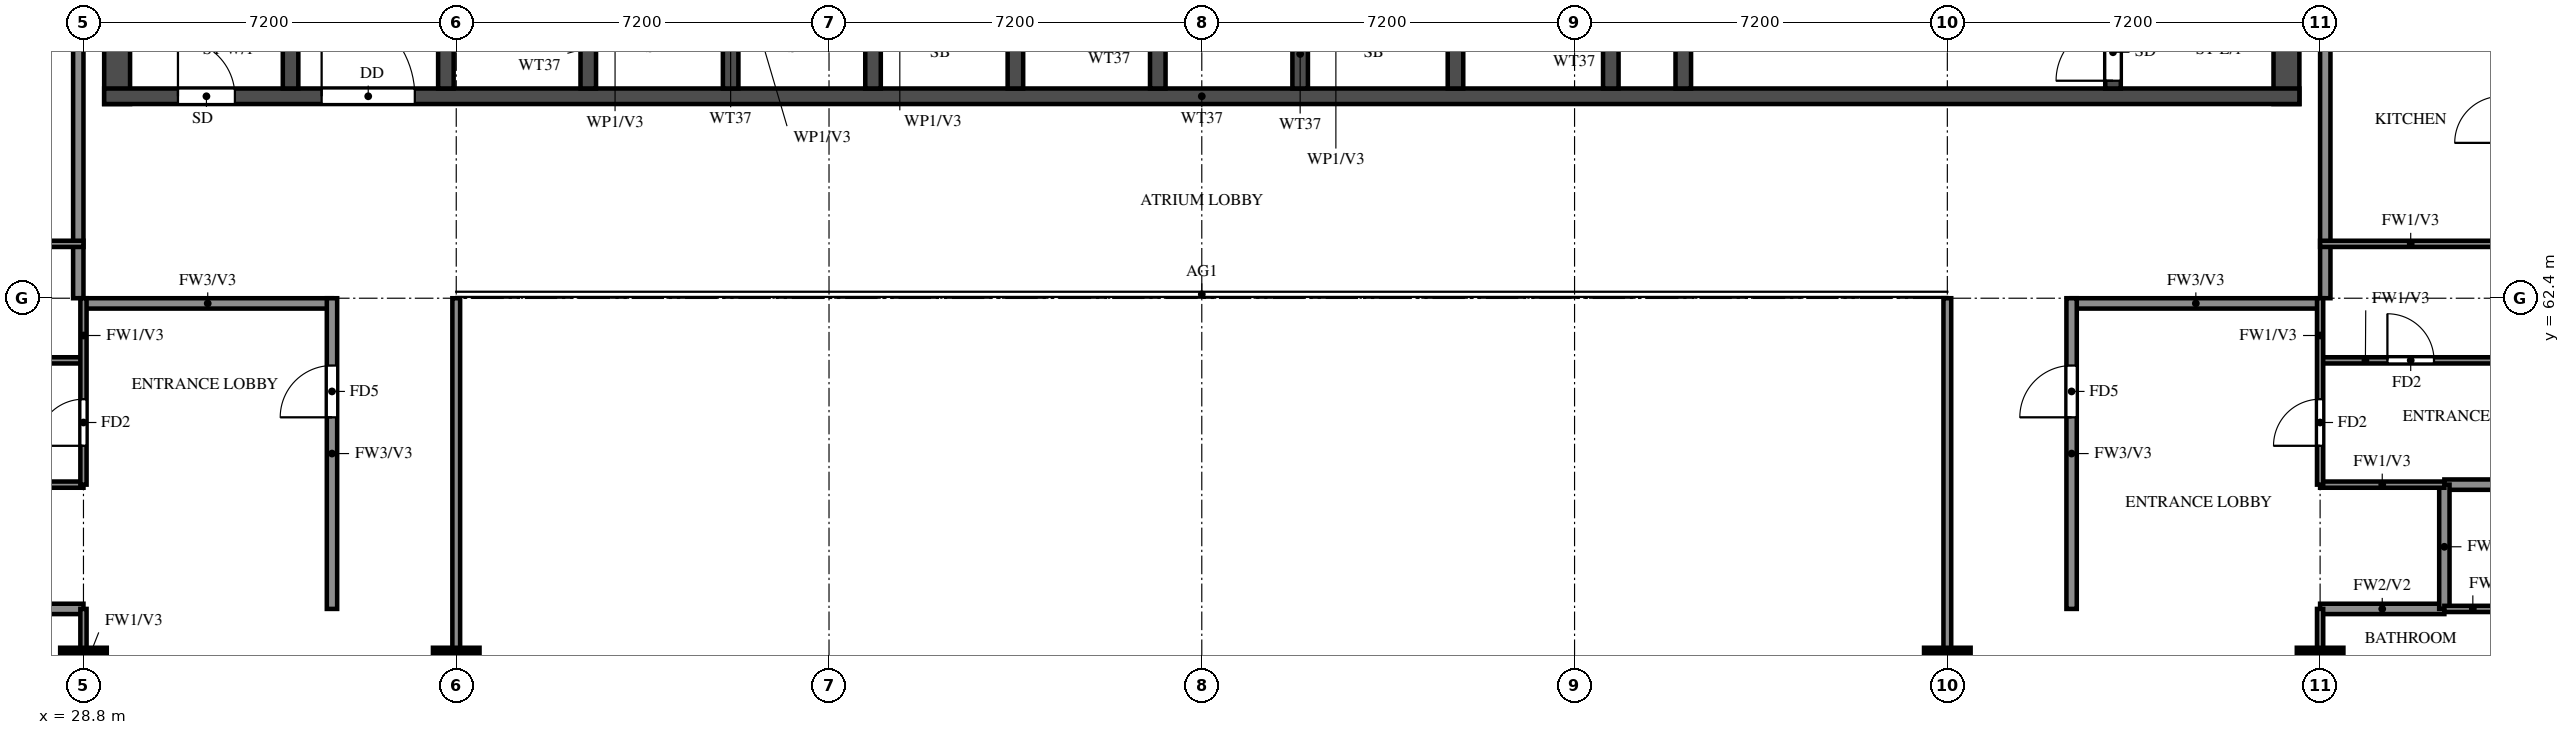
"""IFC4 building model, lengths in metres.
Left out: names, types, materials, properties, quantities, classifications, styles, units other than length and angle.
Written with IfcOpenShell. Run it as: python <this file> out.ifc"""

import sys

from ifc_helpers import new_model, si_unit, direction, frame, frame_2d, origin, origin_2d, place, context, subcontext, project, spatial, rectangle, extrude, source, transform, mapped, element, fill, save


model = new_model("IFC4")
c1 = context("Model", 3, precision=1e-05, world=origin(), true_north=direction((0.0, 1.0)))
c2 = subcontext(c1, "Body", "Model", "MODEL_VIEW")
j1 = project(units=[si_unit("LENGTHUNIT", "METRE"), si_unit("PLANEANGLEUNIT", "RADIAN")], contexts=[c1])
p1 = place(None, origin())
s1 = spatial("IfcSite", under=j1, at=p1, CompositionType="ELEMENT")
p2 = place(p1, origin())
s2 = spatial("IfcBuilding", under=s1, at=p2, CompositionType="ELEMENT")
p3 = place(p2, frame((0.0, 0.0, 215.0)))
s3 = spatial("IfcBuildingStorey", under=s2, at=p3, CompositionType="ELEMENT", Elevation=215.0)
m1 = source(origin(), c2, "Body", "SweptSolid", [
    extrude(rectangle(XDim=0.9, YDim=0.9, at=origin_2d()), origin(), (0.0, 0.0, 1.0), 3.22),
])
for number, where, z_axis, x_axis in (
    (1, (28.8, 55.2, 0.0), (0.0, 0.0, 1.0), (1.0, 0.0, 0.0)),
    (2, (36.0, 55.2, 0.0), (0.0, 0.0, 1.0), (1.0, 0.0, 0.0)),
    (3, (64.8, 55.2, 0.0), (0.0, 0.0, 1.0), (1.0, 0.0, 0.0)),
    (4, (72.0, 55.2, 0.0), (0.0, 0.0, 1.0), (1.0, 0.0, 0.0)),
):
    element("IfcColumn", number, at=place(p3, frame(where, z_axis=z_axis, x_axis=x_axis)), inside=s3, PredefinedType="COLUMN", context=c2, shape_type="MappedRepresentation", body=[
        mapped(m1, transform((0.0, 0.0, 0.0))),
    ])
for number, where, z_axis, x_axis in (
    (5, (29.45, 66.15, 0.0), (0.0, 0.0, 1.0), (0.0, 1.0, 0.0)),
    (6, (71.35, 66.15, 0.0), (0.0, 0.0, 1.0), (0.0, 1.0, 0.0)),
):
    element("IfcWall", number, at=place(p3, frame(where, z_axis=z_axis, x_axis=x_axis)), inside=s3, PredefinedType="SHEAR", context=c2, shape_type="SweptSolid", body=[
        extrude(rectangle(XDim=11.85, YDim=0.5, at=frame_2d((5.925, 0.0))), origin(), (0.0, 0.0, 1.0), 3.22),
    ])
p4 = place(p3, frame((29.2, 66.3, 0.0), z_axis=(0.0, 0.0, 1.0), x_axis=(1.0, 0.0, 0.0)))
e7 = element("IfcWall", 7, at=p4, inside=s3, PredefinedType="SHEAR", context=c2, shape_type="SweptSolid", body=[
    extrude(rectangle(XDim=42.4, YDim=0.3, at=frame_2d((21.2, 0.0))), origin(), (0.0, 0.0, 1.0), 3.22),
])
p5 = place(p4, frame((1.425, 0.0, 0.0)))
e8 = element("IfcOpeningElement", 8, at=p5, cuts=e7, PredefinedType="OPENING", context=c2, shape_type="SweptSolid", body=[
    extrude(rectangle(XDim=1.1, YDim=2.1, at=frame_2d((0.55, 1.05))), frame((0.0, 0.16, 0.0), z_axis=(0.0, -1.0, 0.0), x_axis=(1.0, 0.0, 0.0)), (0.0, 0.0, 1.0), 0.32),
])
p6 = place(p4, frame((4.2, 0.0, 0.0)))
e9 = element("IfcOpeningElement", 9, at=p6, cuts=e7, PredefinedType="OPENING", context=c2, shape_type="SweptSolid", body=[
    extrude(rectangle(XDim=1.8, YDim=2.1, at=frame_2d((0.9, 1.05))), frame((0.0, 0.16, 0.0), z_axis=(0.0, -1.0, 0.0), x_axis=(1.0, 0.0, 0.0)), (0.0, 0.0, 1.0), 0.32),
])
p7 = place(p3, frame((32.8, 66.45, 0.0), z_axis=(0.0, 0.0, 1.0), x_axis=(0.0, 1.0, 0.0)))
e10 = element("IfcWall", 10, at=p7, inside=s3, PredefinedType="SHEAR", context=c2, shape_type="SweptSolid", body=[
    extrude(rectangle(XDim=11.05, YDim=0.3, at=frame_2d((5.525, 0.0))), origin(), (0.0, 0.0, 1.0), 3.22),
])
p8 = place(p3, frame((68.0, 66.45, 0.0), z_axis=(0.0, 0.0, 1.0), x_axis=(0.0, 1.0, 0.0)))
e11 = element("IfcWall", 11, at=p8, inside=s3, PredefinedType="SHEAR", context=c2, shape_type="SweptSolid", body=[
    extrude(rectangle(XDim=11.05, YDim=0.3, at=frame_2d((5.525, 0.0))), origin(), (0.0, 0.0, 1.0), 3.22),
])
p9 = place(p8, frame((0.15, 0.0, 0.0)))
e12 = element("IfcOpeningElement", 12, at=p9, cuts=e11, PredefinedType="OPENING", context=c2, shape_type="SweptSolid", body=[
    extrude(rectangle(XDim=1.1, YDim=2.1, at=frame_2d((0.55, 1.05))), frame((0.0, 0.16, 0.0), z_axis=(0.0, -1.0, 0.0), x_axis=(1.0, 0.0, 0.0)), (0.0, 0.0, 1.0), 0.32),
])
p10 = place(p3, frame((59.7, 66.45, 0.0), z_axis=(0.0, 0.0, 1.0), x_axis=(0.0, 1.0, 0.0)))
e13 = element("IfcWall", 13, at=p10, inside=s3, PredefinedType="SHEAR", context=c2, shape_type="SweptSolid", body=[
    extrude(rectangle(XDim=6.175, YDim=0.3, at=frame_2d((3.087, 0.0))), origin(), (0.0, 0.0, 1.0), 3.22),
])
p11 = place(p10, frame((3.85, 0.0, 0.0)))
e14 = element("IfcOpeningElement", 14, at=p11, cuts=e13, PredefinedType="OPENING", context=c2, shape_type="SweptSolid", body=[
    extrude(rectangle(XDim=1.2, YDim=2.1, at=frame_2d((0.6, 1.05))), frame((0.0, 0.16, 0.0), z_axis=(0.0, -1.0, 0.0), x_axis=(1.0, 0.0, 0.0)), (0.0, 0.0, 1.0), 0.32),
])
for number, where, z_axis, x_axis in (
    (15, (35.8, 66.45, 0.0), (0.0, 0.0, 1.0), (0.0, 1.0, 0.0)),
    (16, (38.55, 66.45, 0.0), (0.0, 0.0, 1.0), (0.0, 1.0, 0.0)),
    (17, (41.3, 66.45, 0.0), (0.0, 0.0, 1.0), (0.0, 1.0, 0.0)),
    (18, (44.05, 66.45, 0.0), (0.0, 0.0, 1.0), (0.0, 1.0, 0.0)),
    (19, (46.8, 66.45, 0.0), (0.0, 0.0, 1.0), (0.0, 1.0, 0.0)),
    (20, (49.55, 66.45, 0.0), (0.0, 0.0, 1.0), (0.0, 1.0, 0.0)),
    (21, (52.3, 66.45, 0.0), (0.0, 0.0, 1.0), (0.0, 1.0, 0.0)),
    (22, (55.3, 66.45, 0.0), (0.0, 0.0, 1.0), (0.0, 1.0, 0.0)),
    (23, (58.3, 66.45, 0.0), (0.0, 0.0, 1.0), (0.0, 1.0, 0.0)),
):
    element("IfcWall", number, at=place(p3, frame(where, z_axis=z_axis, x_axis=x_axis)), inside=s3, PredefinedType="SHEAR", context=c2, shape_type="SweptSolid", body=[
        extrude(rectangle(XDim=2.425, YDim=0.3, at=frame_2d((1.212, 0.0))), origin(), (0.0, 0.0, 1.0), 3.22),
    ])
for number, where, z_axis, x_axis in (
    (24, (28.8, 62.3, 0.0), (0.0, 0.0, 1.0), (1.0, 0.0, 0.0)),
    (25, (67.2, 62.3, 0.0), (0.0, 0.0, 1.0), (1.0, 0.0, 0.0)),
):
    element("IfcWall", number, at=place(p3, frame(where, z_axis=z_axis, x_axis=x_axis)), inside=s3, PredefinedType="SOLIDWALL", context=c2, shape_type="SweptSolid", body=[
        extrude(rectangle(XDim=4.8, YDim=0.2, at=frame_2d((2.4, 0.0))), origin(), (0.0, 0.0, 1.0), 3.22),
    ])
p12 = place(p3, frame((28.7, 62.4, 0.0), z_axis=(0.0, 0.0, 1.0), x_axis=(0.0, 1.0, 0.0)))
e26 = element("IfcWall", 26, at=p12, inside=s3, PredefinedType="SOLIDWALL", context=c2, shape_type="SweptSolid", body=[
    extrude(rectangle(XDim=15.6, YDim=0.2, at=frame_2d((7.8, 0.0))), origin(), (0.0, 0.0, 1.0), 3.22),
])
p13 = place(p3, frame((33.6, 56.4, 0.0), z_axis=(0.0, 0.0, 1.0), x_axis=(0.0, 1.0, 0.0)))
e27 = element("IfcWall", 27, at=p13, inside=s3, PredefinedType="SOLIDWALL", context=c2, shape_type="SweptSolid", body=[
    extrude(rectangle(XDim=6.0, YDim=0.2, at=frame_2d((3.0, 0.0))), origin(), (0.0, 0.0, 1.0), 3.22),
])
p14 = place(p13, frame((3.7, 0.0, 0.0)))
e28 = element("IfcOpeningElement", 28, at=p14, cuts=e27, PredefinedType="OPENING", context=c2, shape_type="SweptSolid", body=[
    extrude(rectangle(XDim=1.0, YDim=2.1, at=frame_2d((0.5, 1.05))), frame((0.0, 0.11, 0.0), z_axis=(0.0, -1.0, 0.0), x_axis=(1.0, 0.0, 0.0)), (0.0, 0.0, 1.0), 0.22),
])
p15 = place(p3, frame((67.2, 56.4, 0.0), z_axis=(0.0, 0.0, 1.0), x_axis=(0.0, 1.0, 0.0)))
e29 = element("IfcWall", 29, at=p15, inside=s3, PredefinedType="SOLIDWALL", context=c2, shape_type="SweptSolid", body=[
    extrude(rectangle(XDim=6.0, YDim=0.2, at=frame_2d((3.0, 0.0))), origin(), (0.0, 0.0, 1.0), 3.22),
])
p16 = place(p15, frame((3.7, 0.0, 0.0)))
e30 = element("IfcOpeningElement", 30, at=p16, cuts=e29, PredefinedType="OPENING", context=c2, shape_type="SweptSolid", body=[
    extrude(rectangle(XDim=1.0, YDim=2.1, at=frame_2d((0.5, 1.05))), frame((0.0, 0.11, 0.0), z_axis=(0.0, -1.0, 0.0), x_axis=(1.0, 0.0, 0.0)), (0.0, 0.0, 1.0), 0.22),
])
p17 = place(p3, frame((72.1, 62.4, 0.0), z_axis=(0.0, 0.0, 1.0), x_axis=(0.0, 1.0, 0.0)))
e31 = element("IfcWall", 31, at=p17, inside=s3, PredefinedType="SOLIDWALL", context=c2, shape_type="SweptSolid", body=[
    extrude(rectangle(XDim=15.6, YDim=0.2, at=frame_2d((7.8, 0.0))), origin(), (0.0, 0.0, 1.0), 3.22),
])
p18 = place(p3, frame((26.4, 56.4, 0.0), z_axis=(0.0, 0.0, 1.0), x_axis=(1.0, 0.0, 0.0)))
e32 = element("IfcWall", 32, at=p18, inside=s3, PredefinedType="SOLIDWALL", context=c2, shape_type="SweptSolid", body=[
    extrude(rectangle(XDim=2.4, YDim=0.2, at=frame_2d((1.2, 0.0))), origin(), (0.0, 0.0, 1.0), 3.22),
])
p19 = place(p3, frame((72.0, 56.4, 0.0), z_axis=(0.0, 0.0, 1.0), x_axis=(1.0, 0.0, 0.0)))
e33 = element("IfcWall", 33, at=p19, inside=s3, PredefinedType="SOLIDWALL", context=c2, shape_type="SweptSolid", body=[
    extrude(rectangle(XDim=2.4, YDim=0.2, at=frame_2d((1.2, 0.0))), origin(), (0.0, 0.0, 1.0), 3.22),
])
p20 = place(p3, frame((74.4, 58.8, 0.0), z_axis=(0.0, 0.0, 1.0), x_axis=(1.0, 0.0, 0.0)))
e34 = element("IfcWall", 34, at=p20, inside=s3, PredefinedType="SOLIDWALL", context=c2, shape_type="SweptSolid", body=[
    extrude(rectangle(XDim=7.875, YDim=0.2, at=frame_2d((3.938, 0.0))), origin(), (0.0, 0.0, 1.0), 2.32),
])
p21 = place(p3, frame((74.4, 56.4, 0.0), z_axis=(0.0, 0.0, 1.0), x_axis=(0.0, 1.0, 0.0)))
e35 = element("IfcWall", 35, at=p21, inside=s3, PredefinedType="SOLIDWALL", context=c2, shape_type="SweptSolid", body=[
    extrude(rectangle(XDim=2.4, YDim=0.2, at=frame_2d((1.2, 0.0))), origin(), (0.0, 0.0, 1.0), 3.22),
])
p22 = place(p3, frame((74.4, 56.4, 0.0), z_axis=(0.0, 0.0, 1.0), x_axis=(1.0, 0.0, 0.0)))
e36 = element("IfcWall", 36, at=p22, inside=s3, PredefinedType="PARTITIONING", context=c2, shape_type="SweptSolid", body=[
    extrude(rectangle(XDim=1.1, YDim=0.12, at=frame_2d((0.55, 0.0))), origin(), (0.0, 0.0, 1.0), 3.22),
])
p23 = place(p3, frame((26.4, 58.8, 0.0), z_axis=(0.0, 0.0, 1.0), x_axis=(1.0, 0.0, 0.0)))
e37 = element("IfcWall", 37, at=p23, inside=s3, PredefinedType="PARTITIONING", context=c2, shape_type="SweptSolid", body=[
    extrude(rectangle(XDim=2.4, YDim=0.12, at=frame_2d((1.2, 0.0))), origin(), (0.0, 0.0, 1.0), 3.22),
])
p24 = place(p3, frame((72.0, 58.8, 0.0), z_axis=(0.0, 0.0, 1.0), x_axis=(1.0, 0.0, 0.0)))
e38 = element("IfcWall", 38, at=p24, inside=s3, PredefinedType="PARTITIONING", context=c2, shape_type="SweptSolid", body=[
    extrude(rectangle(XDim=2.4, YDim=0.12, at=frame_2d((1.2, 0.0))), origin(), (0.0, 0.0, 1.0), 3.22),
])
p25 = place(p3, frame((25.3, 61.2, 0.0), z_axis=(0.0, 0.0, 1.0), x_axis=(1.0, 0.0, 0.0)))
e39 = element("IfcWall", 39, at=p25, inside=s3, PredefinedType="PARTITIONING", context=c2, shape_type="SweptSolid", body=[
    extrude(rectangle(XDim=3.5, YDim=0.12, at=frame_2d((1.75, 0.0))), origin(), (0.0, 0.0, 1.0), 3.22),
])
p26 = place(p25, frame((1.3, 0.0, 0.0)))
e40 = element("IfcOpeningElement", 40, at=p26, cuts=e39, PredefinedType="OPENING", context=c2, shape_type="SweptSolid", body=[
    extrude(rectangle(XDim=0.9, YDim=2.1, at=frame_2d((0.45, 1.05))), frame((0.0, 0.07, 0.0), z_axis=(0.0, -1.0, 0.0), x_axis=(1.0, 0.0, 0.0)), (0.0, 0.0, 1.0), 0.14),
])
p27 = place(p3, frame((72.0, 61.2, 0.0), z_axis=(0.0, 0.0, 1.0), x_axis=(1.0, 0.0, 0.0)))
e41 = element("IfcWall", 41, at=p27, inside=s3, PredefinedType="PARTITIONING", context=c2, shape_type="SweptSolid", body=[
    extrude(rectangle(XDim=3.5, YDim=0.12, at=frame_2d((1.75, 0.0))), origin(), (0.0, 0.0, 1.0), 3.22),
])
p28 = place(p27, frame((1.3, 0.0, 0.0)))
e42 = element("IfcOpeningElement", 42, at=p28, cuts=e41, PredefinedType="OPENING", context=c2, shape_type="SweptSolid", body=[
    extrude(rectangle(XDim=0.9, YDim=2.1, at=frame_2d((0.45, 1.05))), frame((0.0, 0.07, 0.0), z_axis=(0.0, -1.0, 0.0), x_axis=(1.0, 0.0, 0.0)), (0.0, 0.0, 1.0), 0.14),
])
for number, where, z_axis, x_axis in (
    (43, (25.3, 63.45, 0.0), (0.0, 0.0, 1.0), (1.0, 0.0, 0.0)),
    (44, (72.0, 63.45, 0.0), (0.0, 0.0, 1.0), (1.0, 0.0, 0.0)),
):
    element("IfcWall", number, at=place(p3, frame(where, z_axis=z_axis, x_axis=x_axis)), inside=s3, PredefinedType="PARTITIONING", context=c2, shape_type="SweptSolid", body=[
        extrude(rectangle(XDim=3.5, YDim=0.12, at=frame_2d((1.75, 0.0))), origin(), (0.0, 0.0, 1.0), 3.22),
    ])
p29 = place(p3, frame((28.8, 54.0, 0.0), z_axis=(0.0, 0.0, 1.0), x_axis=(0.0, 1.0, 0.0)))
e45 = element("IfcWall", 45, at=p29, inside=s3, PredefinedType="PARTITIONING", context=c2, shape_type="SweptSolid", body=[
    extrude(rectangle(XDim=2.4, YDim=0.12, at=frame_2d((1.2, 0.0))), origin(), (0.0, 0.0, 1.0), 3.22),
])
p30 = place(p3, frame((28.8, 58.8, 0.0), z_axis=(0.0, 0.0, 1.0), x_axis=(0.0, 1.0, 0.0)))
e46 = element("IfcWall", 46, at=p30, inside=s3, PredefinedType="PARTITIONING", context=c2, shape_type="SweptSolid", body=[
    extrude(rectangle(XDim=3.6, YDim=0.12, at=frame_2d((1.8, 0.0))), origin(), (0.0, 0.0, 1.0), 3.22),
])
p31 = place(p30, frame((0.75, 0.0, 0.0)))
e47 = element("IfcOpeningElement", 47, at=p31, cuts=e46, PredefinedType="OPENING", context=c2, shape_type="SweptSolid", body=[
    extrude(rectangle(XDim=0.9, YDim=2.1, at=frame_2d((0.45, 1.05))), frame((0.0, 0.07, 0.0), z_axis=(0.0, -1.0, 0.0), x_axis=(1.0, 0.0, 0.0)), (0.0, 0.0, 1.0), 0.14),
])
p32 = place(p3, frame((72.0, 54.0, 0.0), z_axis=(0.0, 0.0, 1.0), x_axis=(0.0, 1.0, 0.0)))
e48 = element("IfcWall", 48, at=p32, inside=s3, PredefinedType="PARTITIONING", context=c2, shape_type="SweptSolid", body=[
    extrude(rectangle(XDim=2.4, YDim=0.12, at=frame_2d((1.2, 0.0))), origin(), (0.0, 0.0, 1.0), 3.22),
])
p33 = place(p3, frame((72.0, 58.8, 0.0), z_axis=(0.0, 0.0, 1.0), x_axis=(0.0, 1.0, 0.0)))
e49 = element("IfcWall", 49, at=p33, inside=s3, PredefinedType="PARTITIONING", context=c2, shape_type="SweptSolid", body=[
    extrude(rectangle(XDim=3.6, YDim=0.12, at=frame_2d((1.8, 0.0))), origin(), (0.0, 0.0, 1.0), 3.22),
])
p34 = place(p33, frame((0.75, 0.0, 0.0)))
e50 = element("IfcOpeningElement", 50, at=p34, cuts=e49, PredefinedType="OPENING", context=c2, shape_type="SweptSolid", body=[
    extrude(rectangle(XDim=0.9, YDim=2.1, at=frame_2d((0.45, 1.05))), frame((0.0, 0.07, 0.0), z_axis=(0.0, -1.0, 0.0), x_axis=(1.0, 0.0, 0.0)), (0.0, 0.0, 1.0), 0.14),
])
for number, where, z_axis, x_axis in (
    (51, (36.0, 48.0, 0.0), (0.0, 0.0, 1.0), (0.0, 1.0, 0.0)),
    (52, (64.8, 48.0, 0.0), (0.0, 0.0, 1.0), (0.0, 1.0, 0.0)),
):
    element("IfcWall", number, at=place(p3, frame(where, z_axis=z_axis, x_axis=x_axis)), inside=s3, PredefinedType="SOLIDWALL", context=c2, shape_type="SweptSolid", body=[
        extrude(rectangle(XDim=14.4, YDim=0.15, at=frame_2d((7.2, 0.0))), origin(), (0.0, 0.0, 1.0), 2.32),
    ])
p35 = place(p5, origin())
e53 = element("IfcDoor", 53, at=p35, inside=s3, OperationType="SINGLE_SWING_LEFT", PredefinedType="DOOR", context=c2, shape_type="SweptSolid", body=[
    extrude(rectangle(XDim=1.1, YDim=2.1, at=frame_2d((0.55, 1.05))), frame((0.0, 0.025, 0.0), z_axis=(0.0, -1.0, 0.0), x_axis=(1.0, 0.0, 0.0)), (0.0, 0.0, 1.0), 0.05),
])
fill(e8, e53)
p36 = place(p9, origin())
e54 = element("IfcDoor", 54, at=p36, inside=s3, OperationType="SINGLE_SWING_RIGHT", PredefinedType="DOOR", context=c2, shape_type="SweptSolid", body=[
    extrude(rectangle(XDim=1.1, YDim=2.1, at=frame_2d((0.55, 1.05))), frame((0.0, 0.025, 0.0), z_axis=(0.0, -1.0, 0.0), x_axis=(1.0, 0.0, 0.0)), (0.0, 0.0, 1.0), 0.05),
])
fill(e12, e54)
p37 = place(p6, origin())
e55 = element("IfcDoor", 55, at=p37, inside=s3, OperationType="DOUBLE_DOOR_SINGLE_SWING", PredefinedType="DOOR", context=c2, shape_type="SweptSolid", body=[
    extrude(rectangle(XDim=1.8, YDim=2.1, at=frame_2d((0.9, 1.05))), frame((0.0, 0.025, 0.0), z_axis=(0.0, -1.0, 0.0), x_axis=(1.0, 0.0, 0.0)), (0.0, 0.0, 1.0), 0.05),
])
fill(e9, e55)
p38 = place(p31, origin())
e56 = element("IfcDoor", 56, at=p38, inside=s3, OperationType="SINGLE_SWING_LEFT", PredefinedType="DOOR", context=c2, shape_type="SweptSolid", body=[
    extrude(rectangle(XDim=0.9, YDim=2.1, at=frame_2d((0.45, 1.05))), frame((0.0, 0.025, 0.0), z_axis=(0.0, -1.0, 0.0), x_axis=(1.0, 0.0, 0.0)), (0.0, 0.0, 1.0), 0.05),
])
fill(e47, e56)
p39 = place(p14, origin())
e57 = element("IfcDoor", 57, at=p39, inside=s3, OperationType="SINGLE_SWING_LEFT", PredefinedType="DOOR", context=c2, shape_type="SweptSolid", body=[
    extrude(rectangle(XDim=1.0, YDim=2.1, at=frame_2d((0.5, 1.05))), frame((0.0, 0.025, 0.0), z_axis=(0.0, -1.0, 0.0), x_axis=(1.0, 0.0, 0.0)), (0.0, 0.0, 1.0), 0.05),
])
fill(e28, e57)
p40 = place(p34, origin())
e58 = element("IfcDoor", 58, at=p40, inside=s3, OperationType="SINGLE_SWING_LEFT", PredefinedType="DOOR", context=c2, shape_type="SweptSolid", body=[
    extrude(rectangle(XDim=0.9, YDim=2.1, at=frame_2d((0.45, 1.05))), frame((0.0, 0.025, 0.0), z_axis=(0.0, -1.0, 0.0), x_axis=(1.0, 0.0, 0.0)), (0.0, 0.0, 1.0), 0.05),
])
fill(e50, e58)
p41 = place(p16, origin())
e59 = element("IfcDoor", 59, at=p41, inside=s3, OperationType="SINGLE_SWING_RIGHT", PredefinedType="DOOR", context=c2, shape_type="SweptSolid", body=[
    extrude(rectangle(XDim=1.0, YDim=2.1, at=frame_2d((0.5, 1.05))), frame((0.0, 0.025, 0.0), z_axis=(0.0, -1.0, 0.0), x_axis=(1.0, 0.0, 0.0)), (0.0, 0.0, 1.0), 0.05),
])
fill(e30, e59)
p42 = place(p28, origin())
e60 = element("IfcDoor", 60, at=p42, inside=s3, OperationType="SINGLE_SWING_LEFT", PredefinedType="DOOR", context=c2, shape_type="SweptSolid", body=[
    extrude(rectangle(XDim=0.9, YDim=2.1, at=frame_2d((0.45, 1.05))), frame((0.0, 0.025, 0.0), z_axis=(0.0, -1.0, 0.0), x_axis=(1.0, 0.0, 0.0)), (0.0, 0.0, 1.0), 0.05),
])
fill(e42, e60)
save(model, sys.argv[1])
